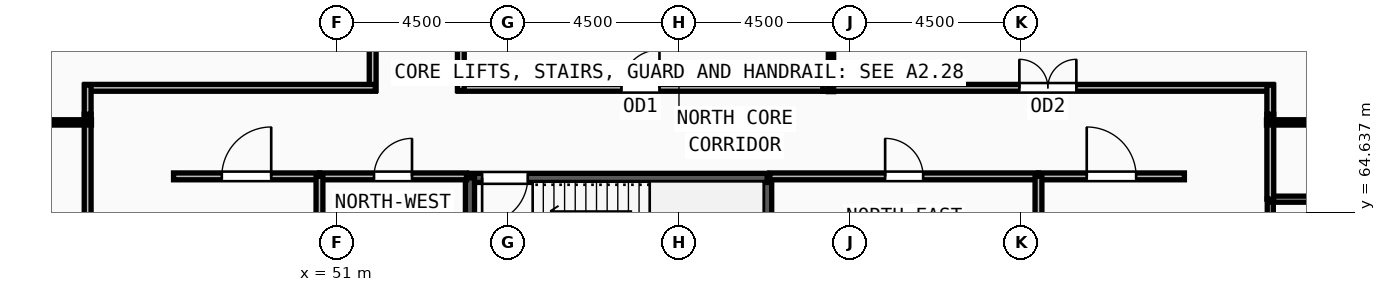
"""IFC4 building model, lengths in metres.
Left out: names, types, materials, properties, quantities, classifications, styles, units other than length and angle.
Written with IfcOpenShell. Run it as: python <this file> out.ifc"""

import sys

from ifc_helpers import new_model, si_unit, direction, frame, frame_2d, origin, place, context, subcontext, project, spatial, rectangle, extrude, source, transform, mapped, element, fill, save


model = new_model("IFC4")
c1 = context("Model", 3, precision=1e-05, world=origin(), true_north=direction((0.0, 1.0)))
c2 = subcontext(c1, "Body", "Model", "MODEL_VIEW")
j1 = project(units=[si_unit("LENGTHUNIT", "METRE"), si_unit("PLANEANGLEUNIT", "RADIAN")], contexts=[c1])
p1 = place(None, origin())
s1 = spatial("IfcSite", under=j1, at=p1, CompositionType="ELEMENT")
p2 = place(p1, origin())
s2 = spatial("IfcBuilding", under=s1, at=p2, CompositionType="ELEMENT")
p3 = place(p2, frame((0.0, 0.0, 320.25)))
s3 = spatial("IfcBuildingStorey", under=s2, at=p3, CompositionType="ELEMENT", Elevation=320.25)
p4 = place(p3, frame((62.32, 62.1, 0.0), z_axis=(0.0, 0.0, 1.0), x_axis=(0.0, 1.0, 0.0)))
e1 = element("IfcWall", 1, at=p4, inside=s3, PredefinedType="SOLIDWALL", context=c2, shape_type="SweptSolid", body=[
    extrude(rectangle(XDim=3.44, YDim=0.24, at=frame_2d((1.72, 0.0))), origin(), (0.0, 0.0, 1.0), 3.47),
])
p5 = place(p3, frame((62.32, 65.54, 0.0), z_axis=(0.0, 0.0, 1.0), x_axis=(-1.0, 0.0, 0.0)))
e2 = element("IfcWall", 2, at=p5, inside=s3, PredefinedType="SOLIDWALL", context=c2, shape_type="SweptSolid", body=[
    extrude(rectangle(XDim=7.82, YDim=0.24, at=frame_2d((3.91, 0.0))), origin(), (0.0, 0.0, 1.0), 3.47),
])
m1 = source(origin(), c2, "Body", "SweptSolid", [
    extrude(rectangle(XDim=1.2, YDim=2.2, at=frame_2d((0.6, 1.1))), frame((0.0, 0.13, 0.0), z_axis=(0.0, -1.0, 0.0), x_axis=(1.0, 0.0, 0.0)), (0.0, 0.0, 1.0), 0.26),
])
p6 = place(p5, frame((6.3, 0.0, 0.0)))
e3 = element("IfcOpeningElement", 3, at=p6, cuts=e2, PredefinedType="OPENING", context=c2, shape_type="MappedRepresentation", body=[
    mapped(m1, transform((0.0, 0.0, 0.0), x_axis=(1.0, 0.0, 0.0), y_axis=(0.0, 1.0, 0.0), z_axis=(0.0, 0.0, 1.0), scale=1.0)),
])
p7 = place(p3, frame((54.5, 65.54, 0.0), z_axis=(0.0, 0.0, 1.0), x_axis=(0.0, -1.0, 0.0)))
e4 = element("IfcWall", 4, at=p7, inside=s3, PredefinedType="SOLIDWALL", context=c2, shape_type="SweptSolid", body=[
    extrude(rectangle(XDim=3.44, YDim=0.24, at=frame_2d((1.72, 0.0))), origin(), (0.0, 0.0, 1.0), 3.47),
])
p8 = place(p3, frame((75.56, 62.24, 0.0), z_axis=(0.0, 0.0, 1.0), x_axis=(0.0, 1.0, 0.0)))
e5 = element("IfcWall", 5, at=p8, inside=s3, PredefinedType="PARTITIONING", context=c2, shape_type="SweptSolid", body=[
    extrude(rectangle(XDim=2.74, YDim=0.16, at=frame_2d((1.37, 0.0))), origin(), (0.0, 0.0, 1.0), 3.47),
])
m2 = source(origin(), c2, "Body", "SweptSolid", [
    extrude(rectangle(XDim=1.05, YDim=2.15, at=frame_2d((0.525, 1.075))), frame((0.0, 0.09, 0.0), z_axis=(0.0, -1.0, 0.0), x_axis=(1.0, 0.0, 0.0)), (0.0, 0.0, 1.0), 0.18),
])
p9 = place(p8, frame((0.845, 0.0, 0.0)))
e6 = element("IfcOpeningElement", 6, at=p9, cuts=e5, PredefinedType="OPENING", context=c2, shape_type="MappedRepresentation", body=[
    mapped(m2, transform((0.0, 0.0, 0.0), x_axis=(1.0, 0.0, 0.0), y_axis=(0.0, 1.0, 0.0), z_axis=(0.0, 0.0, 1.0), scale=1.0)),
])
p10 = place(p3, frame((50.54, 65.58, 0.0), z_axis=(0.0, 0.0, 1.0), x_axis=(1.0, 0.0, 0.0)))
e7 = element("IfcWall", 7, at=p10, inside=s3, PredefinedType="PARTITIONING", context=c2, shape_type="SweptSolid", body=[
    extrude(rectangle(XDim=3.87, YDim=0.18, at=frame_2d((1.935, 0.0))), origin(), (0.0, 0.0, 1.0), 3.47),
])
m3 = source(origin(), c2, "Body", "SweptSolid", [
    extrude(rectangle(XDim=1.0, YDim=2.2, at=frame_2d((0.5, 1.1))), frame((0.0, 0.1, 0.0), z_axis=(0.0, -1.0, 0.0), x_axis=(1.0, 0.0, 0.0)), (0.0, 0.0, 1.0), 0.2),
])
p11 = place(p10, frame((1.435, 0.0, 0.0)))
e8 = element("IfcOpeningElement", 8, at=p11, cuts=e7, PredefinedType="OPENING", context=c2, shape_type="MappedRepresentation", body=[
    mapped(m3, transform((0.0, 0.0, 0.0), x_axis=(1.0, 0.0, 0.0), y_axis=(0.0, 1.0, 0.0), z_axis=(0.0, 0.0, 1.0), scale=1.0)),
])
p12 = place(p3, frame((62.39, 65.58, 0.0), z_axis=(0.0, 0.0, 1.0), x_axis=(1.0, 0.0, 0.0)))
e9 = element("IfcWall", 9, at=p12, inside=s3, PredefinedType="PARTITIONING", context=c2, shape_type="SweptSolid", body=[
    extrude(rectangle(XDim=7.07, YDim=0.18, at=frame_2d((3.535, 0.0))), origin(), (0.0, 0.0, 1.0), 3.47),
])
p13 = place(p12, frame((3.035, 0.0, 0.0)))
e10 = element("IfcOpeningElement", 10, at=p13, cuts=e9, PredefinedType="OPENING", context=c2, shape_type="MappedRepresentation", body=[
    mapped(m3, transform((0.0, 0.0, 0.0), x_axis=(1.0, 0.0, 0.0), y_axis=(0.0, 1.0, 0.0), z_axis=(0.0, 0.0, 1.0), scale=1.0)),
])
p14 = place(p3, frame((46.7, 65.58, 0.0), z_axis=(0.0, 0.0, 1.0), x_axis=(1.0, 0.0, 0.0)))
e11 = element("IfcWall", 11, at=p14, inside=s3, PredefinedType="PARTITIONING", context=c2, shape_type="SweptSolid", body=[
    extrude(rectangle(XDim=3.84, YDim=0.18, at=frame_2d((1.92, 0.0))), origin(), (0.0, 0.0, 1.0), 3.47),
])
m4 = source(origin(), c2, "Body", "SweptSolid", [
    extrude(rectangle(XDim=1.3, YDim=2.2, at=frame_2d((0.65, 1.1))), frame((0.0, 0.1, 0.0), z_axis=(0.0, -1.0, 0.0), x_axis=(1.0, 0.0, 0.0)), (0.0, 0.0, 1.0), 0.2),
])
p15 = place(p14, frame((1.27, 0.0, 0.0)))
e12 = element("IfcOpeningElement", 12, at=p15, cuts=e11, PredefinedType="OPENING", context=c2, shape_type="MappedRepresentation", body=[
    mapped(m4, transform((0.0, 0.0, 0.0), x_axis=(1.0, 0.0, 0.0), y_axis=(0.0, 1.0, 0.0), z_axis=(0.0, 0.0, 1.0), scale=1.0)),
])
p16 = place(p3, frame((69.46, 65.58, 0.0), z_axis=(0.0, 0.0, 1.0), x_axis=(1.0, 0.0, 0.0)))
e13 = element("IfcWall", 13, at=p16, inside=s3, PredefinedType="PARTITIONING", context=c2, shape_type="SweptSolid", body=[
    extrude(rectangle(XDim=3.84, YDim=0.18, at=frame_2d((1.92, 0.0))), origin(), (0.0, 0.0, 1.0), 3.47),
])
p17 = place(p16, frame((1.27, 0.0, 0.0)))
e14 = element("IfcOpeningElement", 14, at=p17, cuts=e13, PredefinedType="OPENING", context=c2, shape_type="MappedRepresentation", body=[
    mapped(m4, transform((0.0, 0.0, 0.0), x_axis=(1.0, 0.0, 0.0), y_axis=(0.0, 1.0, 0.0), z_axis=(0.0, 0.0, 1.0), scale=1.0)),
])
p18 = place(p3, frame((63.785, 67.91, 0.0), z_axis=(0.0, 0.0, 1.0), x_axis=(1.0, 0.0, 0.0)))
e15 = element("IfcWall", 15, at=p18, inside=s3, PredefinedType="PARTITIONING", context=c2, shape_type="SweptSolid", body=[
    extrude(rectangle(XDim=11.845, YDim=0.18, at=frame_2d((5.922, 0.0))), origin(), (0.0, 0.0, 1.0), 3.47),
])
m5 = source(origin(), c2, "Body", "SweptSolid", [
    extrude(rectangle(XDim=1.5, YDim=2.2, at=frame_2d((0.75, 1.1))), frame((0.0, 0.1, 0.0), z_axis=(0.0, -1.0, 0.0), x_axis=(1.0, 0.0, 0.0)), (0.0, 0.0, 1.0), 0.2),
])
p19 = place(p18, frame((5.172, 0.0, 0.0)))
e16 = element("IfcOpeningElement", 16, at=p19, cuts=e15, PredefinedType="OPENING", context=c2, shape_type="MappedRepresentation", body=[
    mapped(m5, transform((0.0, 0.0, 0.0), x_axis=(1.0, 0.0, 0.0), y_axis=(0.0, 1.0, 0.0), z_axis=(0.0, 0.0, 1.0), scale=1.0)),
])
p20 = place(p3, frame((54.19, 67.91, 0.0), z_axis=(0.0, 0.0, 1.0), x_axis=(1.0, 0.0, 0.0)))
e17 = element("IfcWall", 17, at=p20, inside=s3, PredefinedType="PARTITIONING", context=c2, shape_type="SweptSolid", body=[
    extrude(rectangle(XDim=9.595, YDim=0.18, at=frame_2d((4.797, 0.0))), origin(), (0.0, 0.0, 1.0), 3.47),
])
p21 = place(p20, frame((4.297, 0.0, 0.0)))
e18 = element("IfcOpeningElement", 18, at=p21, cuts=e17, PredefinedType="OPENING", context=c2, shape_type="MappedRepresentation", body=[
    mapped(m3, transform((0.0, 0.0, 0.0), x_axis=(1.0, 0.0, 0.0), y_axis=(0.0, 1.0, 0.0), z_axis=(0.0, 0.0, 1.0), scale=1.0)),
])
p22 = place(p3, frame((51.94, 67.84, 0.0), z_axis=(0.0, 0.0, 1.0), x_axis=(0.0, 1.0, 0.0)))
e19 = element("IfcWall", 19, at=p22, inside=s3, PredefinedType="PARTITIONING", context=c2, shape_type="SweptSolid", body=[
    extrude(rectangle(XDim=7.731, YDim=0.18, at=frame_2d((3.865, 0.0))), origin(), (0.0, 0.0, 1.0), 3.47),
])
p23 = place(p22, frame((3.115, 0.0, 0.0)))
e20 = element("IfcOpeningElement", 20, at=p23, cuts=e19, PredefinedType="OPENING", context=c2, shape_type="MappedRepresentation", body=[
    mapped(m5, transform((0.0, 0.0, 0.0), x_axis=(1.0, 0.0, 0.0), y_axis=(0.0, 1.0, 0.0), z_axis=(0.0, 0.0, 1.0), scale=1.0)),
])
p24 = place(p3, frame((44.44, 58.785, 0.0), z_axis=(0.0, 0.0, 1.0), x_axis=(0.0, 1.0, 0.0)))
e21 = element("IfcWall", 21, at=p24, inside=s3, PredefinedType="PARTITIONING", context=c2, shape_type="SweptSolid", body=[
    extrude(rectangle(XDim=8.43, YDim=0.18, at=frame_2d((4.215, 0.0))), origin(), (0.0, 0.0, 1.0), 3.47),
])
p25 = place(p24, frame((3.715, 0.0, 0.0)))
e22 = element("IfcOpeningElement", 22, at=p25, cuts=e21, PredefinedType="OPENING", context=c2, shape_type="MappedRepresentation", body=[
    mapped(m3, transform((0.0, 0.0, 0.0), x_axis=(1.0, 0.0, 0.0), y_axis=(0.0, 1.0, 0.0), z_axis=(0.0, 0.0, 1.0), scale=1.0)),
])
p26 = place(p3, frame((75.56, 64.98, 0.0), z_axis=(0.0, 0.0, 1.0), x_axis=(1.0, 0.0, 0.0)))
e23 = element("IfcWall", 23, at=p26, inside=s3, PredefinedType="PARTITIONING", context=c2, shape_type="SweptSolid", body=[
    extrude(rectangle(XDim=4.46, YDim=0.16, at=frame_2d((2.23, 0.0))), origin(), (0.0, 0.0, 1.0), 3.47),
])
for number, where, z_axis, x_axis in (
    (24, (50.54, 61.95, 0.0), (0.0, 0.0, 1.0), (0.0, 1.0, 0.0)),
    (25, (69.46, 61.95, 0.0), (0.0, 0.0, 1.0), (0.0, 1.0, 0.0)),
):
    element("IfcWall", number, at=place(p3, frame(where, z_axis=z_axis, x_axis=x_axis)), inside=s3, PredefinedType="PARTITIONING", context=c2, shape_type="SweptSolid", body=[
        extrude(rectangle(XDim=3.63, YDim=0.18, at=frame_2d((1.815, 0.0))), origin(), (0.0, 0.0, 1.0), 3.47),
    ])
p27 = place(p3, frame((75.56, 67.215, 0.0), z_axis=(0.0, 0.0, 1.0), x_axis=(0.0, -1.0, 0.0)))
e26 = element("IfcWall", 26, at=p27, inside=s3, PredefinedType="PARTITIONING", context=c2, shape_type="SweptSolid", body=[
    extrude(rectangle(XDim=2.235, YDim=0.18, at=frame_2d((1.118, 0.0))), origin(), (0.0, 0.0, 1.0), 3.47),
])
p28 = place(p3, frame((75.56, 67.98, 0.0), z_axis=(0.0, 0.0, 1.0), x_axis=(0.0, -1.0, 0.0)))
e27 = element("IfcWall", 27, at=p28, inside=s3, PredefinedType="PARTITIONING", context=c2, shape_type="SweptSolid", body=[
    extrude(rectangle(XDim=0.765, YDim=0.18, at=frame_2d((0.382, 0.0))), origin(), (0.0, 0.0, 1.0), 3.47),
])
p29 = place(p3, frame((54.26, 75.729, 0.0), z_axis=(0.0, 0.0, 1.0), x_axis=(0.0, -1.0, 0.0)))
e28 = element("IfcWall", 28, at=p29, inside=s3, PredefinedType="PARTITIONING", context=c2, shape_type="SweptSolid", body=[
    extrude(rectangle(XDim=7.889, YDim=0.18, at=frame_2d((3.944, 0.0))), origin(), (0.0, 0.0, 1.0), 3.47),
])
p30 = place(p3, frame((44.37, 67.91, 0.0), z_axis=(0.0, 0.0, 1.0), x_axis=(1.0, 0.0, 0.0)))
e29 = element("IfcWall", 29, at=p30, inside=s3, PredefinedType="PARTITIONING", context=c2, shape_type="SweptSolid", body=[
    extrude(rectangle(XDim=7.64, YDim=0.18, at=frame_2d((3.82, 0.0))), origin(), (0.0, 0.0, 1.0), 3.47),
])
p31 = place(p3, frame((44.44, 67.215, 0.0), z_axis=(0.0, 0.0, 1.0), x_axis=(0.0, 1.0, 0.0)))
e30 = element("IfcWall", 30, at=p31, inside=s3, PredefinedType="PARTITIONING", context=c2, shape_type="SweptSolid", body=[
    extrude(rectangle(XDim=0.765, YDim=0.18, at=frame_2d((0.382, 0.0))), origin(), (0.0, 0.0, 1.0), 3.47),
])
for number, where, z_axis, x_axis in (
    (31, (44.54, 67.0, 0.0), (0.0, 0.0, 1.0), (-1.0, 0.0, 0.0)),
    (32, (75.46, 67.0, 0.0), (0.0, 0.0, 1.0), (1.0, 0.0, 0.0)),
):
    element("IfcWall", number, at=place(p3, frame(where, z_axis=z_axis, x_axis=x_axis)), inside=s3, PredefinedType="PARTITIONING", context=c2, shape_type="SweptSolid", body=[
        extrude(rectangle(XDim=13.648, YDim=0.14, at=frame_2d((6.824, 0.0))), origin(), (0.0, 0.0, 1.0), 3.161),
    ])
p32 = place(p3, frame((64.0, 67.81, 0.0), z_axis=(0.0, 0.0, 1.0), x_axis=(0.0, 1.0, 0.0)))
e33 = element("IfcWall", 33, at=p32, inside=s3, PredefinedType="PARTITIONING", context=c2, shape_type="SweptSolid", body=[
    extrude(rectangle(XDim=8.416, YDim=0.14, at=frame_2d((4.208, 0.0))), origin(), (0.0, 0.0, 1.0), 3.47),
])
m6 = source(origin(), c2, "Body", "SweptSolid", [
    extrude(rectangle(XDim=1.2, YDim=2.2, at=frame_2d((0.6, 1.1))), frame((0.0, 0.025, 0.0), z_axis=(0.0, -1.0, 0.0), x_axis=(1.0, 0.0, 0.0)), (0.0, 0.0, 1.0), 0.05),
])
p33 = place(p6, origin())
e34 = element("IfcDoor", 34, at=p33, inside=s3, OperationType="SINGLE_SWING_RIGHT", PredefinedType="DOOR", context=c2, shape_type="MappedRepresentation", body=[
    mapped(m6, transform((0.0, 0.0, 0.0), x_axis=(1.0, 0.0, 0.0), y_axis=(0.0, 1.0, 0.0), z_axis=(0.0, 0.0, 1.0), scale=1.0)),
])
fill(e3, e34)
m7 = source(origin(), c2, "Body", "SweptSolid", [
    extrude(rectangle(XDim=1.0, YDim=2.2, at=frame_2d((0.5, 1.1))), frame((0.0, 0.025, 0.0), z_axis=(0.0, -1.0, 0.0), x_axis=(1.0, 0.0, 0.0)), (0.0, 0.0, 1.0), 0.05),
])
p34 = place(p11, origin())
e35 = element("IfcDoor", 35, at=p34, inside=s3, OperationType="SINGLE_SWING_RIGHT", PredefinedType="DOOR", context=c2, shape_type="MappedRepresentation", body=[
    mapped(m7, transform((0.0, 0.0, 0.0), x_axis=(1.0, 0.0, 0.0), y_axis=(0.0, 1.0, 0.0), z_axis=(0.0, 0.0, 1.0), scale=1.0)),
])
fill(e8, e35)
p35 = place(p13, origin())
e36 = element("IfcDoor", 36, at=p35, inside=s3, OperationType="SINGLE_SWING_LEFT", PredefinedType="DOOR", context=c2, shape_type="MappedRepresentation", body=[
    mapped(m7, transform((0.0, 0.0, 0.0), x_axis=(1.0, 0.0, 0.0), y_axis=(0.0, 1.0, 0.0), z_axis=(0.0, 0.0, 1.0), scale=1.0)),
])
fill(e10, e36)
m8 = source(origin(), c2, "Body", "SweptSolid", [
    extrude(rectangle(XDim=1.3, YDim=2.2, at=frame_2d((0.65, 1.1))), frame((0.0, 0.025, 0.0), z_axis=(0.0, -1.0, 0.0), x_axis=(1.0, 0.0, 0.0)), (0.0, 0.0, 1.0), 0.05),
])
p36 = place(p15, origin())
e37 = element("IfcDoor", 37, at=p36, inside=s3, OperationType="SINGLE_SWING_RIGHT", PredefinedType="DOOR", context=c2, shape_type="MappedRepresentation", body=[
    mapped(m8, transform((0.0, 0.0, 0.0), x_axis=(1.0, 0.0, 0.0), y_axis=(0.0, 1.0, 0.0), z_axis=(0.0, 0.0, 1.0), scale=1.0)),
])
fill(e12, e37)
p37 = place(p17, origin())
e38 = element("IfcDoor", 38, at=p37, inside=s3, OperationType="SINGLE_SWING_LEFT", PredefinedType="DOOR", context=c2, shape_type="MappedRepresentation", body=[
    mapped(m8, transform((0.0, 0.0, 0.0), x_axis=(1.0, 0.0, 0.0), y_axis=(0.0, 1.0, 0.0), z_axis=(0.0, 0.0, 1.0), scale=1.0)),
])
fill(e14, e38)
m9 = source(origin(), c2, "Body", "SweptSolid", [
    extrude(rectangle(XDim=1.5, YDim=2.2, at=frame_2d((0.75, 1.1))), frame((0.0, 0.025, 0.0), z_axis=(0.0, -1.0, 0.0), x_axis=(1.0, 0.0, 0.0)), (0.0, 0.0, 1.0), 0.05),
])
p38 = place(p19, origin())
e39 = element("IfcDoor", 39, at=p38, inside=s3, OperationType="DOUBLE_DOOR_SINGLE_SWING", PredefinedType="DOOR", context=c2, shape_type="MappedRepresentation", body=[
    mapped(m9, transform((0.0, 0.0, 0.0), x_axis=(1.0, 0.0, 0.0), y_axis=(0.0, 1.0, 0.0), z_axis=(0.0, 0.0, 1.0), scale=1.0)),
])
fill(e16, e39)
p39 = place(p21, origin())
e40 = element("IfcDoor", 40, at=p39, inside=s3, OperationType="SINGLE_SWING_RIGHT", PredefinedType="DOOR", context=c2, shape_type="MappedRepresentation", body=[
    mapped(m7, transform((0.0, 0.0, 0.0), x_axis=(1.0, 0.0, 0.0), y_axis=(0.0, 1.0, 0.0), z_axis=(0.0, 0.0, 1.0), scale=1.0)),
])
fill(e18, e40)
save(model, sys.argv[1])
